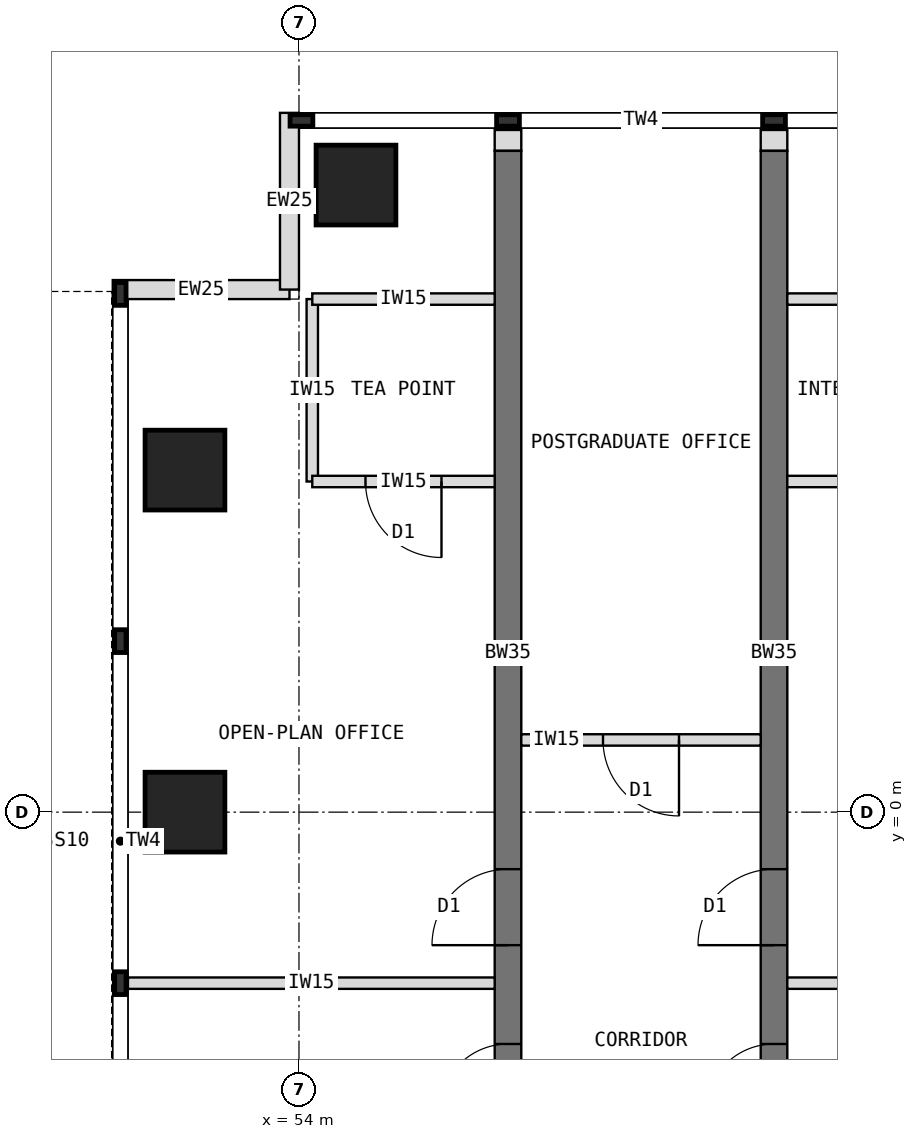
"""IFC4 building model, lengths in metres.
Left out: names, types, materials, properties, quantities, classifications, styles, units other than length and angle.
Written with IfcOpenShell. Run it as: python <this file> out.ifc"""

import sys

from ifc_helpers import new_model, si_unit, direction, frame, frame_2d, origin, origin_2d, place, context, subcontext, project, spatial, rectangle, extrude, element, fill, save


model = new_model("IFC4")
c1 = context("Model", 3, precision=1e-05, world=origin(), true_north=direction((0.0, 1.0)))
c2 = subcontext(c1, "Body", "Model", "MODEL_VIEW")
j1 = project(units=[si_unit("LENGTHUNIT", "METRE"), si_unit("PLANEANGLEUNIT", "RADIAN")], contexts=[c1])
p1 = place(None, origin())
s1 = spatial("IfcSite", under=j1, at=p1, CompositionType="ELEMENT")
p2 = place(p1, origin())
s2 = spatial("IfcBuilding", under=s1, at=p2, CompositionType="ELEMENT")
p3 = place(p2, frame((0.0, 0.0, 255.5)))
s3 = spatial("IfcBuildingStorey", under=s2, at=p3, CompositionType="ELEMENT", Elevation=255.5)
p4 = place(p3, frame((56.75, -4.5, 0.0), z_axis=(0.0, 0.0, 1.0), x_axis=(0.0, 1.0, 0.0)))
e1 = element("IfcWall", 1, at=p4, inside=s3, PredefinedType="SHEAR", context=c2, shape_type="SweptSolid", body=[
    extrude(rectangle(XDim=13.2, YDim=0.35, at=frame_2d((6.6, 0.0))), origin(), (0.0, 0.0, 1.0), 4.0),
])
p5 = place(p4, frame((0.55, 0.0, 0.0)))
e2 = element("IfcOpeningElement", 2, at=p5, cuts=e1, PredefinedType="OPENING", context=c2, shape_type="SweptSolid", body=[
    extrude(rectangle(XDim=0.9, YDim=2.1, at=frame_2d((0.45, 1.05))), frame((0.0, 0.185, 0.0), z_axis=(0.0, -1.0, 0.0), x_axis=(1.0, 0.0, 0.0)), (0.0, 0.0, 1.0), 0.37),
])
p6 = place(p4, frame((2.75, 0.0, 0.0)))
e3 = element("IfcOpeningElement", 3, at=p6, cuts=e1, PredefinedType="OPENING", context=c2, shape_type="SweptSolid", body=[
    extrude(rectangle(XDim=1.0, YDim=2.1, at=frame_2d((0.5, 1.05))), frame((0.0, 0.185, 0.0), z_axis=(0.0, -1.0, 0.0), x_axis=(1.0, 0.0, 0.0)), (0.0, 0.0, 1.0), 0.37),
])
p7 = place(p3, frame((60.25, -4.5, 0.0), z_axis=(0.0, 0.0, 1.0), x_axis=(0.0, 1.0, 0.0)))
e4 = element("IfcWall", 4, at=p7, inside=s3, PredefinedType="SHEAR", context=c2, shape_type="SweptSolid", body=[
    extrude(rectangle(XDim=13.2, YDim=0.35, at=frame_2d((6.6, 0.0))), origin(), (0.0, 0.0, 1.0), 4.0),
])
p8 = place(p7, frame((0.55, 0.0, 0.0)))
e5 = element("IfcOpeningElement", 5, at=p8, cuts=e4, PredefinedType="OPENING", context=c2, shape_type="SweptSolid", body=[
    extrude(rectangle(XDim=0.9, YDim=2.1, at=frame_2d((0.45, 1.05))), frame((0.0, 0.185, 0.0), z_axis=(0.0, -1.0, 0.0), x_axis=(1.0, 0.0, 0.0)), (0.0, 0.0, 1.0), 0.37),
])
p9 = place(p7, frame((2.75, 0.0, 0.0)))
e6 = element("IfcOpeningElement", 6, at=p9, cuts=e4, PredefinedType="OPENING", context=c2, shape_type="SweptSolid", body=[
    extrude(rectangle(XDim=1.0, YDim=2.1, at=frame_2d((0.5, 1.05))), frame((0.0, 0.185, 0.0), z_axis=(0.0, -1.0, 0.0), x_axis=(1.0, 0.0, 0.0)), (0.0, 0.0, 1.0), 0.37),
])
for number, where, z_axis, x_axis in (
    (7, (52.5, 0.0, 0.0), (0.0, 0.0, 1.0), (1.0, 0.0, 0.0)),
    (8, (52.5, 4.5, 0.0), (0.0, 0.0, 1.0), (1.0, 0.0, 0.0)),
    (9, (54.75, 8.25, 0.0), (0.0, 0.0, 1.0), (1.0, 0.0, 0.0)),
):
    element("IfcColumn", number, at=place(p3, frame(where, z_axis=z_axis, x_axis=x_axis)), inside=s3, PredefinedType="COLUMN", context=c2, shape_type="SweptSolid", body=[
        extrude(rectangle(XDim=1.05, YDim=1.05, at=origin_2d()), origin(), (0.0, 0.0, 1.0), 4.0),
    ])
for number, where, z_axis, x_axis in (
    (10, (51.55, 6.875, 0.0), (0.0, 0.0, 1.0), (1.0, 0.0, 0.0)),
    (11, (53.875, 6.875, 0.0), (0.0, 0.0, 1.0), (0.0, 1.0, 0.0)),
):
    element("IfcWall", number, at=place(p3, frame(where, z_axis=z_axis, x_axis=x_axis)), inside=s3, PredefinedType="STANDARD", context=c2, shape_type="SweptSolid", body=[
        extrude(rectangle(XDim=2.325, YDim=0.25, at=frame_2d((1.163, 0.0))), origin(), (0.0, 0.0, 1.0), 3.8),
    ])
for number, where, z_axis, x_axis in (
    (12, (56.75, 8.7, 0.0), (0.0, 0.0, 1.0), (0.0, 1.0, 0.0)),
    (13, (60.25, 8.7, 0.0), (0.0, 0.0, 1.0), (0.0, 1.0, 0.0)),
):
    element("IfcWall", number, at=place(p3, frame(where, z_axis=z_axis, x_axis=x_axis)), inside=s3, PredefinedType="PARTITIONING", context=c2, shape_type="SweptSolid", body=[
        extrude(rectangle(XDim=0.275, YDim=0.35, at=frame_2d((0.138, 0.0))), origin(), (0.0, 0.0, 1.0), 3.8),
    ])
p10 = place(p3, frame((56.575, -2.25, 0.0), z_axis=(0.0, 0.0, 1.0), x_axis=(-1.0, 0.0, 0.0)))
e14 = element("IfcWall", 14, at=p10, inside=s3, PredefinedType="PARTITIONING", context=c2, shape_type="SweptSolid", body=[
    extrude(rectangle(XDim=4.825, YDim=0.15, at=frame_2d((2.413, 0.0))), origin(), (0.0, 0.0, 1.0), 3.8),
])
p11 = place(p3, frame((54.175, 4.35, 0.0), z_axis=(0.0, 0.0, 1.0), x_axis=(0.0, 1.0, 0.0)))
e15 = element("IfcWall", 15, at=p11, inside=s3, PredefinedType="PARTITIONING", context=c2, shape_type="SweptSolid", body=[
    extrude(rectangle(XDim=2.4, YDim=0.15, at=frame_2d((1.2, 0.0))), origin(), (0.0, 0.0, 1.0), 3.8),
])
p12 = place(p3, frame((56.575, 4.35, 0.0), z_axis=(0.0, 0.0, 1.0), x_axis=(-1.0, 0.0, 0.0)))
e16 = element("IfcWall", 16, at=p12, inside=s3, PredefinedType="PARTITIONING", context=c2, shape_type="SweptSolid", body=[
    extrude(rectangle(XDim=2.4, YDim=0.15, at=frame_2d((1.2, 0.0))), origin(), (0.0, 0.0, 1.0), 3.8),
])
p13 = place(p12, frame((0.7, 0.0, 0.0)))
e17 = element("IfcOpeningElement", 17, at=p13, cuts=e16, PredefinedType="OPENING", context=c2, shape_type="SweptSolid", body=[
    extrude(rectangle(XDim=1.0, YDim=2.1, at=frame_2d((0.5, 1.05))), frame((0.0, 0.085, 0.0), z_axis=(0.0, -1.0, 0.0), x_axis=(1.0, 0.0, 0.0)), (0.0, 0.0, 1.0), 0.17),
])
p14 = place(p3, frame((56.575, 6.75, 0.0), z_axis=(0.0, 0.0, 1.0), x_axis=(-1.0, 0.0, 0.0)))
e18 = element("IfcWall", 18, at=p14, inside=s3, PredefinedType="PARTITIONING", context=c2, shape_type="SweptSolid", body=[
    extrude(rectangle(XDim=2.4, YDim=0.15, at=frame_2d((1.2, 0.0))), origin(), (0.0, 0.0, 1.0), 3.8),
])
p15 = place(p3, frame((60.425, -2.25, 0.0), z_axis=(0.0, 0.0, 1.0), x_axis=(1.0, 0.0, 0.0)))
e19 = element("IfcWall", 19, at=p15, inside=s3, PredefinedType="PARTITIONING", context=c2, shape_type="SweptSolid", body=[
    extrude(rectangle(XDim=4.825, YDim=0.15, at=frame_2d((2.413, 0.0))), origin(), (0.0, 0.0, 1.0), 3.8),
])
p16 = place(p3, frame((60.425, 4.35, 0.0), z_axis=(0.0, 0.0, 1.0), x_axis=(1.0, 0.0, 0.0)))
e20 = element("IfcWall", 20, at=p16, inside=s3, PredefinedType="PARTITIONING", context=c2, shape_type="SweptSolid", body=[
    extrude(rectangle(XDim=2.4, YDim=0.15, at=frame_2d((1.2, 0.0))), origin(), (0.0, 0.0, 1.0), 3.8),
])
p17 = place(p16, frame((0.7, 0.0, 0.0)))
e21 = element("IfcOpeningElement", 21, at=p17, cuts=e20, PredefinedType="OPENING", context=c2, shape_type="SweptSolid", body=[
    extrude(rectangle(XDim=1.0, YDim=2.1, at=frame_2d((0.5, 1.05))), frame((0.0, 0.085, 0.0), z_axis=(0.0, -1.0, 0.0), x_axis=(1.0, 0.0, 0.0)), (0.0, 0.0, 1.0), 0.17),
])
p18 = place(p3, frame((60.425, 6.75, 0.0), z_axis=(0.0, 0.0, 1.0), x_axis=(1.0, 0.0, 0.0)))
e22 = element("IfcWall", 22, at=p18, inside=s3, PredefinedType="PARTITIONING", context=c2, shape_type="SweptSolid", body=[
    extrude(rectangle(XDim=2.4, YDim=0.15, at=frame_2d((1.2, 0.0))), origin(), (0.0, 0.0, 1.0), 3.8),
])
p19 = place(p3, frame((60.075, 0.95, 0.0), z_axis=(0.0, 0.0, 1.0), x_axis=(-1.0, 0.0, 0.0)))
e23 = element("IfcWall", 23, at=p19, inside=s3, PredefinedType="PARTITIONING", context=c2, shape_type="SweptSolid", body=[
    extrude(rectangle(XDim=3.15, YDim=0.15, at=frame_2d((1.575, 0.0))), origin(), (0.0, 0.0, 1.0), 3.8),
])
p20 = place(p19, frame((1.075, 0.0, 0.0)))
e24 = element("IfcOpeningElement", 24, at=p20, cuts=e23, PredefinedType="OPENING", context=c2, shape_type="SweptSolid", body=[
    extrude(rectangle(XDim=1.0, YDim=2.1, at=frame_2d((0.5, 1.05))), frame((0.0, 0.085, 0.0), z_axis=(0.0, -1.0, 0.0), x_axis=(1.0, 0.0, 0.0)), (0.0, 0.0, 1.0), 0.17),
])
p21 = place(p13, origin())
e25 = element("IfcDoor", 25, at=p21, inside=s3, OperationType="SINGLE_SWING_LEFT", PredefinedType="DOOR", context=c2, shape_type="SweptSolid", body=[
    extrude(rectangle(XDim=1.0, YDim=2.1, at=frame_2d((0.5, 1.05))), frame((0.0, 0.025, 0.0), z_axis=(0.0, -1.0, 0.0), x_axis=(1.0, 0.0, 0.0)), (0.0, 0.0, 1.0), 0.05),
])
fill(e17, e25)
p22 = place(p20, origin())
e26 = element("IfcDoor", 26, at=p22, inside=s3, OperationType="SINGLE_SWING_LEFT", PredefinedType="DOOR", context=c2, shape_type="SweptSolid", body=[
    extrude(rectangle(XDim=1.0, YDim=2.1, at=frame_2d((0.5, 1.05))), frame((0.0, 0.025, 0.0), z_axis=(0.0, -1.0, 0.0), x_axis=(1.0, 0.0, 0.0)), (0.0, 0.0, 1.0), 0.05),
])
fill(e24, e26)
p23 = place(p5, origin())
e27 = element("IfcDoor", 27, at=p23, inside=s3, OperationType="SINGLE_SWING_LEFT", PredefinedType="DOOR", context=c2, shape_type="SweptSolid", body=[
    extrude(rectangle(XDim=0.9, YDim=2.1, at=frame_2d((0.45, 1.05))), frame((0.0, 0.025, 0.0), z_axis=(0.0, -1.0, 0.0), x_axis=(1.0, 0.0, 0.0)), (0.0, 0.0, 1.0), 0.05),
])
fill(e2, e27)
p24 = place(p6, origin())
e28 = element("IfcDoor", 28, at=p24, inside=s3, OperationType="SINGLE_SWING_LEFT", PredefinedType="DOOR", context=c2, shape_type="SweptSolid", body=[
    extrude(rectangle(XDim=1.0, YDim=2.1, at=frame_2d((0.5, 1.05))), frame((0.0, 0.025, 0.0), z_axis=(0.0, -1.0, 0.0), x_axis=(1.0, 0.0, 0.0)), (0.0, 0.0, 1.0), 0.05),
])
fill(e3, e28)
p25 = place(p8, origin())
e29 = element("IfcDoor", 29, at=p25, inside=s3, OperationType="SINGLE_SWING_LEFT", PredefinedType="DOOR", context=c2, shape_type="SweptSolid", body=[
    extrude(rectangle(XDim=0.9, YDim=2.1, at=frame_2d((0.45, 1.05))), frame((0.0, 0.025, 0.0), z_axis=(0.0, -1.0, 0.0), x_axis=(1.0, 0.0, 0.0)), (0.0, 0.0, 1.0), 0.05),
])
fill(e5, e29)
p26 = place(p9, origin())
e30 = element("IfcDoor", 30, at=p26, inside=s3, OperationType="SINGLE_SWING_LEFT", PredefinedType="DOOR", context=c2, shape_type="SweptSolid", body=[
    extrude(rectangle(XDim=1.0, YDim=2.1, at=frame_2d((0.5, 1.05))), frame((0.0, 0.025, 0.0), z_axis=(0.0, -1.0, 0.0), x_axis=(1.0, 0.0, 0.0)), (0.0, 0.0, 1.0), 0.05),
])
fill(e6, e30)
save(model, sys.argv[1])
